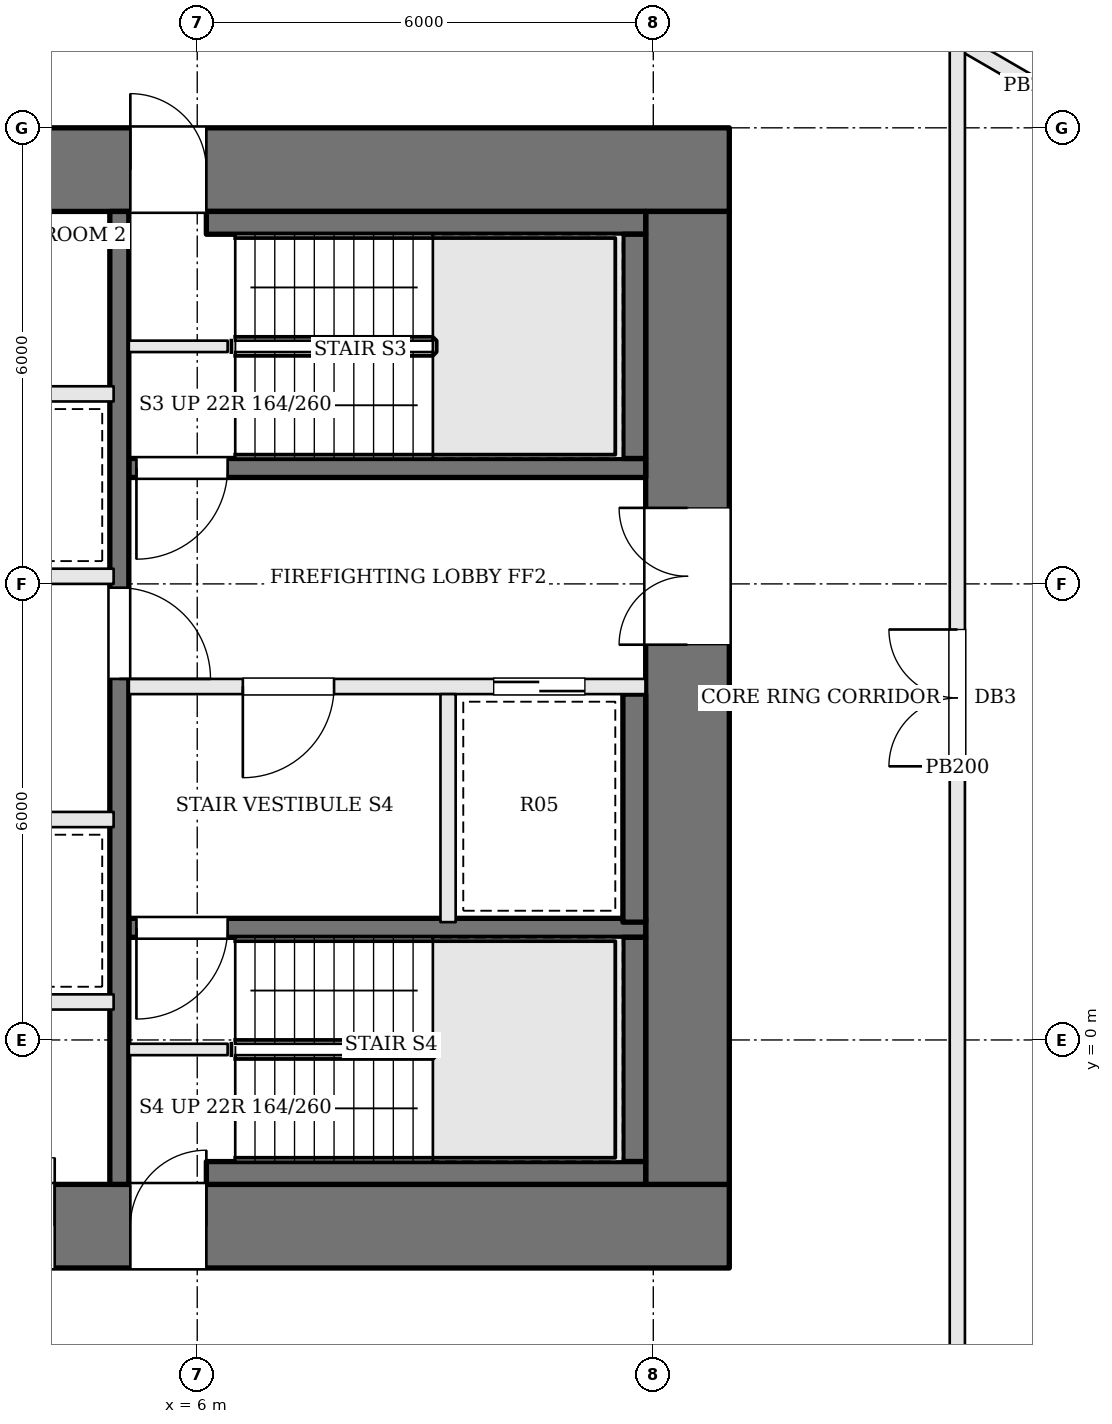
"""IFC4 building model, lengths in metres.
Left out: names, types, materials, properties, quantities, classifications, styles, units other than length and angle.
Written with IfcOpenShell. Run it as: python <this file> out.ifc"""

import sys

from ifc_helpers import new_model, si_unit, direction, frame, frame_2d, origin, place, context, subcontext, project, spatial, rectangle, extrude, element, fill, save


model = new_model("IFC4")
c1 = context("Model", 3, precision=1e-05, world=origin(), true_north=direction((0.0, 1.0)))
c2 = subcontext(c1, "Body", "Model", "MODEL_VIEW")
j1 = project(units=[si_unit("LENGTHUNIT", "METRE"), si_unit("PLANEANGLEUNIT", "RADIAN")], contexts=[c1])
p1 = place(None, origin())
s1 = spatial("IfcSite", under=j1, at=p1, CompositionType="ELEMENT")
p2 = place(p1, origin())
s2 = spatial("IfcBuilding", under=s1, at=p2, CompositionType="ELEMENT")
p3 = place(p2, frame((0.0, 0.0, 106.8)))
s3 = spatial("IfcBuildingStorey", under=s2, at=p3, CompositionType="ELEMENT", Elevation=106.8)
p4 = place(p3, frame((-13.0, 11.45, 0.0), z_axis=(0.0, 0.0, 1.0), x_axis=(1.0, 0.0, 0.0)))
e1 = element("IfcWall", 1, at=p4, inside=s3, PredefinedType="SHEAR", context=c2, shape_type="SweptSolid", body=[
    extrude(rectangle(XDim=26.0, YDim=1.1, at=frame_2d((13.0, 0.0))), origin(), (0.0, 0.0, 1.0), 3.6),
])
p5 = place(p4, frame((8.575, 0.0, 0.0)))
e2 = element("IfcOpeningElement", 2, at=p5, cuts=e1, PredefinedType="OPENING", context=c2, shape_type="SweptSolid", body=[
    extrude(rectangle(XDim=0.7, YDim=2.1, at=frame_2d((0.35, 1.05))), frame((0.0, 0.56, 0.0), z_axis=(0.0, -1.0, 0.0), x_axis=(1.0, 0.0, 0.0)), (0.0, 0.0, 1.0), 1.12),
])
p6 = place(p4, frame((10.875, 0.0, 0.0)))
e3 = element("IfcOpeningElement", 3, at=p6, cuts=e1, PredefinedType="OPENING", context=c2, shape_type="SweptSolid", body=[
    extrude(rectangle(XDim=1.0, YDim=2.1, at=frame_2d((0.5, 1.05))), frame((0.0, 0.56, 0.0), z_axis=(0.0, -1.0, 0.0), x_axis=(1.0, 0.0, 0.0)), (0.0, 0.0, 1.0), 1.12),
])
p7 = place(p4, frame((13.875, 0.0, 0.0)))
e4 = element("IfcOpeningElement", 4, at=p7, cuts=e1, PredefinedType="OPENING", context=c2, shape_type="SweptSolid", body=[
    extrude(rectangle(XDim=0.7, YDim=2.1, at=frame_2d((0.35, 1.05))), frame((0.0, 0.56, 0.0), z_axis=(0.0, -1.0, 0.0), x_axis=(1.0, 0.0, 0.0)), (0.0, 0.0, 1.0), 1.12),
])
p8 = place(p4, frame((16.325, 0.0, 0.0)))
e5 = element("IfcOpeningElement", 5, at=p8, cuts=e1, PredefinedType="OPENING", context=c2, shape_type="SweptSolid", body=[
    extrude(rectangle(XDim=0.7, YDim=2.1, at=frame_2d((0.35, 1.05))), frame((0.0, 0.56, 0.0), z_axis=(0.0, -1.0, 0.0), x_axis=(1.0, 0.0, 0.0)), (0.0, 0.0, 1.0), 1.12),
])
p9 = place(p4, frame((6.88, 0.0, 0.0)))
e6 = element("IfcOpeningElement", 6, at=p9, cuts=e1, PredefinedType="OPENING", context=c2, shape_type="SweptSolid", body=[
    extrude(rectangle(XDim=1.0, YDim=2.1, at=frame_2d((0.5, 1.05))), frame((0.0, 0.56, 0.0), z_axis=(0.0, -1.0, 0.0), x_axis=(1.0, 0.0, 0.0)), (0.0, 0.0, 1.0), 1.12),
])
p10 = place(p4, frame((18.12, 0.0, 0.0)))
e7 = element("IfcOpeningElement", 7, at=p10, cuts=e1, PredefinedType="OPENING", context=c2, shape_type="SweptSolid", body=[
    extrude(rectangle(XDim=1.0, YDim=2.1, at=frame_2d((0.5, 1.05))), frame((0.0, 0.56, 0.0), z_axis=(0.0, -1.0, 0.0), x_axis=(1.0, 0.0, 0.0)), (0.0, 0.0, 1.0), 1.12),
])
p11 = place(p3, frame((-13.0, -2.45, 0.0), z_axis=(0.0, 0.0, 1.0), x_axis=(1.0, 0.0, 0.0)))
e8 = element("IfcWall", 8, at=p11, inside=s3, PredefinedType="SHEAR", context=c2, shape_type="SweptSolid", body=[
    extrude(rectangle(XDim=26.0, YDim=1.1, at=frame_2d((13.0, 0.0))), origin(), (0.0, 0.0, 1.0), 3.6),
])
p12 = place(p11, frame((8.975, 0.0, 0.0)))
e9 = element("IfcOpeningElement", 9, at=p12, cuts=e8, PredefinedType="OPENING", context=c2, shape_type="SweptSolid", body=[
    extrude(rectangle(XDim=0.7, YDim=2.1, at=frame_2d((0.35, 1.05))), frame((0.0, 0.56, 0.0), z_axis=(0.0, -1.0, 0.0), x_axis=(1.0, 0.0, 0.0)), (0.0, 0.0, 1.0), 1.12),
])
p13 = place(p11, frame((11.675, 0.0, 0.0)))
e10 = element("IfcOpeningElement", 10, at=p13, cuts=e8, PredefinedType="OPENING", context=c2, shape_type="SweptSolid", body=[
    extrude(rectangle(XDim=1.0, YDim=2.1, at=frame_2d((0.5, 1.05))), frame((0.0, 0.56, 0.0), z_axis=(0.0, -1.0, 0.0), x_axis=(1.0, 0.0, 0.0)), (0.0, 0.0, 1.0), 1.12),
])
p14 = place(p11, frame((14.275, 0.0, 0.0)))
e11 = element("IfcOpeningElement", 11, at=p14, cuts=e8, PredefinedType="OPENING", context=c2, shape_type="SweptSolid", body=[
    extrude(rectangle(XDim=0.7, YDim=2.1, at=frame_2d((0.35, 1.05))), frame((0.0, 0.56, 0.0), z_axis=(0.0, -1.0, 0.0), x_axis=(1.0, 0.0, 0.0)), (0.0, 0.0, 1.0), 1.12),
])
p15 = place(p11, frame((16.225, 0.0, 0.0)))
e12 = element("IfcOpeningElement", 12, at=p15, cuts=e8, PredefinedType="OPENING", context=c2, shape_type="SweptSolid", body=[
    extrude(rectangle(XDim=0.9, YDim=2.1, at=frame_2d((0.45, 1.05))), frame((0.0, 0.56, 0.0), z_axis=(0.0, -1.0, 0.0), x_axis=(1.0, 0.0, 0.0)), (0.0, 0.0, 1.0), 1.12),
])
p16 = place(p11, frame((6.88, 0.0, 0.0)))
e13 = element("IfcOpeningElement", 13, at=p16, cuts=e8, PredefinedType="OPENING", context=c2, shape_type="SweptSolid", body=[
    extrude(rectangle(XDim=1.0, YDim=2.1, at=frame_2d((0.5, 1.05))), frame((0.0, 0.56, 0.0), z_axis=(0.0, -1.0, 0.0), x_axis=(1.0, 0.0, 0.0)), (0.0, 0.0, 1.0), 1.12),
])
p17 = place(p11, frame((18.12, 0.0, 0.0)))
e14 = element("IfcOpeningElement", 14, at=p17, cuts=e8, PredefinedType="OPENING", context=c2, shape_type="SweptSolid", body=[
    extrude(rectangle(XDim=1.0, YDim=2.1, at=frame_2d((0.5, 1.05))), frame((0.0, 0.56, 0.0), z_axis=(0.0, -1.0, 0.0), x_axis=(1.0, 0.0, 0.0)), (0.0, 0.0, 1.0), 1.12),
])
p18 = place(p3, frame((12.45, -1.9, 0.0), z_axis=(0.0, 0.0, 1.0), x_axis=(0.0, 1.0, 0.0)))
e15 = element("IfcWall", 15, at=p18, inside=s3, PredefinedType="SHEAR", context=c2, shape_type="SweptSolid", body=[
    extrude(rectangle(XDim=12.8, YDim=1.1, at=frame_2d((6.4, 0.0))), origin(), (0.0, 0.0, 1.0), 3.6),
])
p19 = place(p18, frame((7.1, 0.0, 0.0)))
e16 = element("IfcOpeningElement", 16, at=p19, cuts=e15, PredefinedType="OPENING", context=c2, shape_type="SweptSolid", body=[
    extrude(rectangle(XDim=1.8, YDim=2.1, at=frame_2d((0.9, 1.05))), frame((0.0, 0.56, 0.0), z_axis=(0.0, -1.0, 0.0), x_axis=(1.0, 0.0, 0.0)), (0.0, 0.0, 1.0), 1.12),
])
for number, where, z_axis, x_axis in (
    (17, (6.4, 9.125, 0.0), (0.0, 0.0, 1.0), (-1.0, 0.0, 0.0)),
    (18, (6.4, -0.125, 0.0), (0.0, 0.0, 1.0), (-1.0, 0.0, 0.0)),
):
    element("IfcWall", number, at=place(p3, frame(where, z_axis=z_axis, x_axis=x_axis)), inside=s3, PredefinedType="SOLIDWALL", context=c2, shape_type="SweptSolid", body=[
        extrude(rectangle(XDim=1.3, YDim=0.15, at=frame_2d((0.65, 0.0))), origin(), (0.0, 0.0, 1.0), 3.4),
    ])
p20 = place(p3, frame((11.9, 7.525, 0.0), z_axis=(0.0, 0.0, 1.0), x_axis=(-1.0, 0.0, 0.0)))
e19 = element("IfcWall", 19, at=p20, inside=s3, PredefinedType="SOLIDWALL", context=c2, shape_type="SweptSolid", body=[
    extrude(rectangle(XDim=6.8, YDim=0.25, at=frame_2d((3.4, 0.0))), origin(), (0.0, 0.0, 1.0), 3.4),
])
p21 = place(p20, frame((5.5, 0.0, 0.0)))
e20 = element("IfcOpeningElement", 20, at=p21, cuts=e19, PredefinedType="OPENING", context=c2, shape_type="SweptSolid", body=[
    extrude(rectangle(XDim=1.2, YDim=2.1, at=frame_2d((0.6, 1.05))), frame((0.0, 0.135, 0.0), z_axis=(0.0, -1.0, 0.0), x_axis=(1.0, 0.0, 0.0)), (0.0, 0.0, 1.0), 0.27),
])
p22 = place(p3, frame((11.9, 4.65, 0.0), z_axis=(0.0, 0.0, 1.0), x_axis=(-1.0, 0.0, 0.0)))
e21 = element("IfcWall", 21, at=p22, inside=s3, PredefinedType="SOLIDWALL", context=c2, shape_type="SweptSolid", body=[
    extrude(rectangle(XDim=6.8, YDim=0.2, at=frame_2d((3.4, 0.0))), origin(), (0.0, 0.0, 1.0), 3.4),
])
p23 = place(p22, frame((4.1, 0.0, 0.0)))
e22 = element("IfcOpeningElement", 22, at=p23, cuts=e21, PredefinedType="OPENING", context=c2, shape_type="SweptSolid", body=[
    extrude(rectangle(XDim=1.2, YDim=2.1, at=frame_2d((0.6, 1.05))), frame((0.0, 0.11, 0.0), z_axis=(0.0, -1.0, 0.0), x_axis=(1.0, 0.0, 0.0)), (0.0, 0.0, 1.0), 0.22),
])
p24 = place(p22, frame((0.8, 0.0, 0.0)))
e23 = element("IfcOpeningElement", 23, at=p24, cuts=e21, PredefinedType="OPENING", context=c2, shape_type="SweptSolid", body=[
    extrude(rectangle(XDim=1.2, YDim=2.1, at=frame_2d((0.6, 1.05))), frame((0.0, 0.11, 0.0), z_axis=(0.0, -1.0, 0.0), x_axis=(1.0, 0.0, 0.0)), (0.0, 0.0, 1.0), 0.22),
])
p25 = place(p3, frame((11.9, 1.475, 0.0), z_axis=(0.0, 0.0, 1.0), x_axis=(-1.0, 0.0, 0.0)))
e24 = element("IfcWall", 24, at=p25, inside=s3, PredefinedType="SOLIDWALL", context=c2, shape_type="SweptSolid", body=[
    extrude(rectangle(XDim=6.8, YDim=0.25, at=frame_2d((3.4, 0.0))), origin(), (0.0, 0.0, 1.0), 3.4),
])
p26 = place(p25, frame((5.5, 0.0, 0.0)))
e25 = element("IfcOpeningElement", 25, at=p26, cuts=e24, PredefinedType="OPENING", context=c2, shape_type="SweptSolid", body=[
    extrude(rectangle(XDim=1.2, YDim=2.1, at=frame_2d((0.6, 1.05))), frame((0.0, 0.135, 0.0), z_axis=(0.0, -1.0, 0.0), x_axis=(1.0, 0.0, 0.0)), (0.0, 0.0, 1.0), 0.27),
])
p27 = place(p3, frame((9.3, 4.55, 0.0), z_axis=(0.0, 0.0, 1.0), x_axis=(0.0, -1.0, 0.0)))
e26 = element("IfcWall", 26, at=p27, inside=s3, PredefinedType="SOLIDWALL", context=c2, shape_type="SweptSolid", body=[
    extrude(rectangle(XDim=3.0, YDim=0.2, at=frame_2d((1.5, 0.0))), origin(), (0.0, 0.0, 1.0), 3.4),
])
p28 = place(p3, frame((4.975, 10.9, 0.0), z_axis=(0.0, 0.0, 1.0), x_axis=(0.0, -1.0, 0.0)))
e27 = element("IfcWall", 27, at=p28, inside=s3, PredefinedType="SOLIDWALL", context=c2, shape_type="SweptSolid", body=[
    extrude(rectangle(XDim=12.8, YDim=0.25, at=frame_2d((6.4, 0.0))), origin(), (0.0, 0.0, 1.0), 3.4),
])
p29 = place(p28, frame((4.95, 0.0, 0.0)))
e28 = element("IfcOpeningElement", 28, at=p29, cuts=e27, PredefinedType="OPENING", context=c2, shape_type="SweptSolid", body=[
    extrude(rectangle(XDim=1.2, YDim=2.1, at=frame_2d((0.6, 1.05))), frame((0.0, 0.135, 0.0), z_axis=(0.0, -1.0, 0.0), x_axis=(1.0, 0.0, 0.0)), (0.0, 0.0, 1.0), 0.27),
])
p30 = place(p3, frame((11.9, 10.75, 0.0), z_axis=(0.0, 0.0, 1.0), x_axis=(-1.0, 0.0, 0.0)))
e29 = element("IfcWall", 29, at=p30, inside=s3, PredefinedType="SOLIDWALL", context=c2, shape_type="SweptSolid", body=[
    extrude(rectangle(XDim=5.78, YDim=0.3, at=frame_2d((2.89, 0.0))), origin(), (0.0, 0.0, 1.0), 3.4),
])
p31 = place(p3, frame((11.75, 10.6, 0.0), z_axis=(0.0, 0.0, 1.0), x_axis=(0.0, -1.0, 0.0)))
e30 = element("IfcWall", 30, at=p31, inside=s3, PredefinedType="SOLIDWALL", context=c2, shape_type="SweptSolid", body=[
    extrude(rectangle(XDim=2.95, YDim=0.3, at=frame_2d((1.475, 0.0))), origin(), (0.0, 0.0, 1.0), 3.4),
])
p32 = place(p3, frame((11.75, 4.55, 0.0), z_axis=(0.0, 0.0, 1.0), x_axis=(0.0, -1.0, 0.0)))
e31 = element("IfcWall", 31, at=p32, inside=s3, PredefinedType="SOLIDWALL", context=c2, shape_type="SweptSolid", body=[
    extrude(rectangle(XDim=3.0, YDim=0.3, at=frame_2d((1.5, 0.0))), origin(), (0.0, 0.0, 1.0), 3.4),
])
p33 = place(p3, frame((11.75, 1.35, 0.0), z_axis=(0.0, 0.0, 1.0), x_axis=(0.0, -1.0, 0.0)))
e32 = element("IfcWall", 32, at=p33, inside=s3, PredefinedType="SOLIDWALL", context=c2, shape_type="SweptSolid", body=[
    extrude(rectangle(XDim=2.95, YDim=0.3, at=frame_2d((1.475, 0.0))), origin(), (0.0, 0.0, 1.0), 3.4),
])
p34 = place(p3, frame((11.9, -1.75, 0.0), z_axis=(0.0, 0.0, 1.0), x_axis=(-1.0, 0.0, 0.0)))
e33 = element("IfcWall", 33, at=p34, inside=s3, PredefinedType="SOLIDWALL", context=c2, shape_type="SweptSolid", body=[
    extrude(rectangle(XDim=5.78, YDim=0.3, at=frame_2d((2.89, 0.0))), origin(), (0.0, 0.0, 1.0), 3.4),
])
for number, where, z_axis, x_axis in (
    (34, (-4.9, 0.5, 0.0), (0.0, 0.0, 1.0), (1.0, 0.0, 0.0)),
    (35, (-4.9, 2.9, 0.0), (0.0, 0.0, 1.0), (1.0, 0.0, 0.0)),
    (36, (-4.9, 6.1, 0.0), (0.0, 0.0, 1.0), (1.0, 0.0, 0.0)),
    (37, (-4.9, 8.5, 0.0), (0.0, 0.0, 1.0), (1.0, 0.0, 0.0)),
):
    element("IfcWall", number, at=place(p3, frame(where, z_axis=z_axis, x_axis=x_axis)), inside=s3, PredefinedType="SOLIDWALL", context=c2, shape_type="SweptSolid", body=[
        extrude(rectangle(XDim=9.8, YDim=0.2, at=frame_2d((4.9, 0.0))), origin(), (0.0, 0.0, 1.0), 3.4),
    ])
p35 = place(p3, frame((15.913, 13.202, 0.0), z_axis=(0.0, 0.0, 1.0), x_axis=(0.86524014554, -0.501357647339, 0.0)))
e38 = element("IfcWall", 38, at=p35, inside=s3, PredefinedType="PARTITIONING", context=c2, shape_type="SweptSolid", body=[
    extrude(rectangle(XDim=2.575, YDim=0.2, at=frame_2d((1.288, 0.0))), origin(), (0.0, 0.0, 1.0), 3.4),
])
p36 = place(p3, frame((16.0, -5.9, 0.0), z_axis=(0.0, 0.0, 1.0), x_axis=(0.0, 1.0, 0.0)))
e39 = element("IfcWall", 39, at=p36, inside=s3, PredefinedType="PARTITIONING", context=c2, shape_type="SweptSolid", body=[
    extrude(rectangle(XDim=18.952, YDim=0.2, at=frame_2d((9.476, 0.0))), origin(), (0.0, 0.0, 1.0), 3.4),
])
p37 = place(p36, frame((9.5, 0.0, 0.0)))
e40 = element("IfcOpeningElement", 40, at=p37, cuts=e39, PredefinedType="OPENING", context=c2, shape_type="SweptSolid", body=[
    extrude(rectangle(XDim=1.8, YDim=2.1, at=frame_2d((0.9, 1.05))), frame((0.0, 0.11, 0.0), z_axis=(0.0, -1.0, 0.0), x_axis=(1.0, 0.0, 0.0)), (0.0, 0.0, 1.0), 0.22),
])
p38 = place(p19, origin())
e41 = element("IfcDoor", 41, at=p38, inside=s3, OperationType="DOUBLE_DOOR_SINGLE_SWING", PredefinedType="DOOR", context=c2, shape_type="SweptSolid", body=[
    extrude(rectangle(XDim=1.8, YDim=2.1, at=frame_2d((0.9, 1.05))), frame((0.0, 0.025, 0.0), z_axis=(0.0, -1.0, 0.0), x_axis=(1.0, 0.0, 0.0)), (0.0, 0.0, 1.0), 0.05),
])
fill(e16, e41)
p39 = place(p29, origin())
e42 = element("IfcDoor", 42, at=p39, inside=s3, OperationType="SINGLE_SWING_RIGHT", PredefinedType="DOOR", context=c2, shape_type="SweptSolid", body=[
    extrude(rectangle(XDim=1.2, YDim=2.1, at=frame_2d((0.6, 1.05))), frame((0.0, 0.025, 0.0), z_axis=(0.0, -1.0, 0.0), x_axis=(1.0, 0.0, 0.0)), (0.0, 0.0, 1.0), 0.05),
])
fill(e28, e42)
p40 = place(p23, origin())
e43 = element("IfcDoor", 43, at=p40, inside=s3, OperationType="SINGLE_SWING_RIGHT", PredefinedType="DOOR", context=c2, shape_type="SweptSolid", body=[
    extrude(rectangle(XDim=1.2, YDim=2.1, at=frame_2d((0.6, 1.05))), frame((0.0, 0.025, 0.0), z_axis=(0.0, -1.0, 0.0), x_axis=(1.0, 0.0, 0.0)), (0.0, 0.0, 1.0), 0.05),
])
fill(e22, e43)
p41 = place(p21, origin())
e44 = element("IfcDoor", 44, at=p41, inside=s3, OperationType="SINGLE_SWING_RIGHT", PredefinedType="DOOR", context=c2, shape_type="SweptSolid", body=[
    extrude(rectangle(XDim=1.2, YDim=2.1, at=frame_2d((0.6, 1.05))), frame((0.0, 0.025, 0.0), z_axis=(0.0, -1.0, 0.0), x_axis=(1.0, 0.0, 0.0)), (0.0, 0.0, 1.0), 0.05),
])
fill(e20, e44)
p42 = place(p26, origin())
e45 = element("IfcDoor", 45, at=p42, inside=s3, OperationType="SINGLE_SWING_RIGHT", PredefinedType="DOOR", context=c2, shape_type="SweptSolid", body=[
    extrude(rectangle(XDim=1.2, YDim=2.1, at=frame_2d((0.6, 1.05))), frame((0.0, 0.025, 0.0), z_axis=(0.0, -1.0, 0.0), x_axis=(1.0, 0.0, 0.0)), (0.0, 0.0, 1.0), 0.05),
])
fill(e25, e45)
p43 = place(p24, origin())
e46 = element("IfcDoor", 46, at=p43, inside=s3, OperationType="SLIDING_TO_RIGHT", PredefinedType="DOOR", context=c2, shape_type="SweptSolid", body=[
    extrude(rectangle(XDim=1.2, YDim=2.1, at=frame_2d((0.6, 1.05))), frame((0.0, 0.025, 0.0), z_axis=(0.0, -1.0, 0.0), x_axis=(1.0, 0.0, 0.0)), (0.0, 0.0, 1.0), 0.05),
])
fill(e23, e46)
p44 = place(p15, origin())
e47 = element("IfcDoor", 47, at=p44, inside=s3, OperationType="SINGLE_SWING_RIGHT", PredefinedType="DOOR", context=c2, shape_type="SweptSolid", body=[
    extrude(rectangle(XDim=0.9, YDim=2.1, at=frame_2d((0.45, 1.05))), frame((0.0, 0.025, 0.0), z_axis=(0.0, -1.0, 0.0), x_axis=(1.0, 0.0, 0.0)), (0.0, 0.0, 1.0), 0.05),
])
fill(e12, e47)
p45 = place(p10, origin())
e48 = element("IfcDoor", 48, at=p45, inside=s3, OperationType="SINGLE_SWING_LEFT", PredefinedType="DOOR", context=c2, shape_type="SweptSolid", body=[
    extrude(rectangle(XDim=1.0, YDim=2.1, at=frame_2d((0.5, 1.05))), frame((0.0, 0.025, 0.0), z_axis=(0.0, -1.0, 0.0), x_axis=(1.0, 0.0, 0.0)), (0.0, 0.0, 1.0), 0.05),
])
fill(e7, e48)
p46 = place(p17, origin())
e49 = element("IfcDoor", 49, at=p46, inside=s3, OperationType="SINGLE_SWING_RIGHT", PredefinedType="DOOR", context=c2, shape_type="SweptSolid", body=[
    extrude(rectangle(XDim=1.0, YDim=2.1, at=frame_2d((0.5, 1.05))), frame((0.0, 0.025, 0.0), z_axis=(0.0, -1.0, 0.0), x_axis=(1.0, 0.0, 0.0)), (0.0, 0.0, 1.0), 0.05),
])
fill(e14, e49)
p47 = place(p37, origin())
e50 = element("IfcDoor", 50, at=p47, inside=s3, OperationType="DOUBLE_DOOR_SINGLE_SWING", PredefinedType="DOOR", context=c2, shape_type="SweptSolid", body=[
    extrude(rectangle(XDim=1.8, YDim=2.1, at=frame_2d((0.9, 1.05))), frame((0.0, 0.025, 0.0), z_axis=(0.0, -1.0, 0.0), x_axis=(1.0, 0.0, 0.0)), (0.0, 0.0, 1.0), 0.05),
])
fill(e40, e50)
save(model, sys.argv[1])
